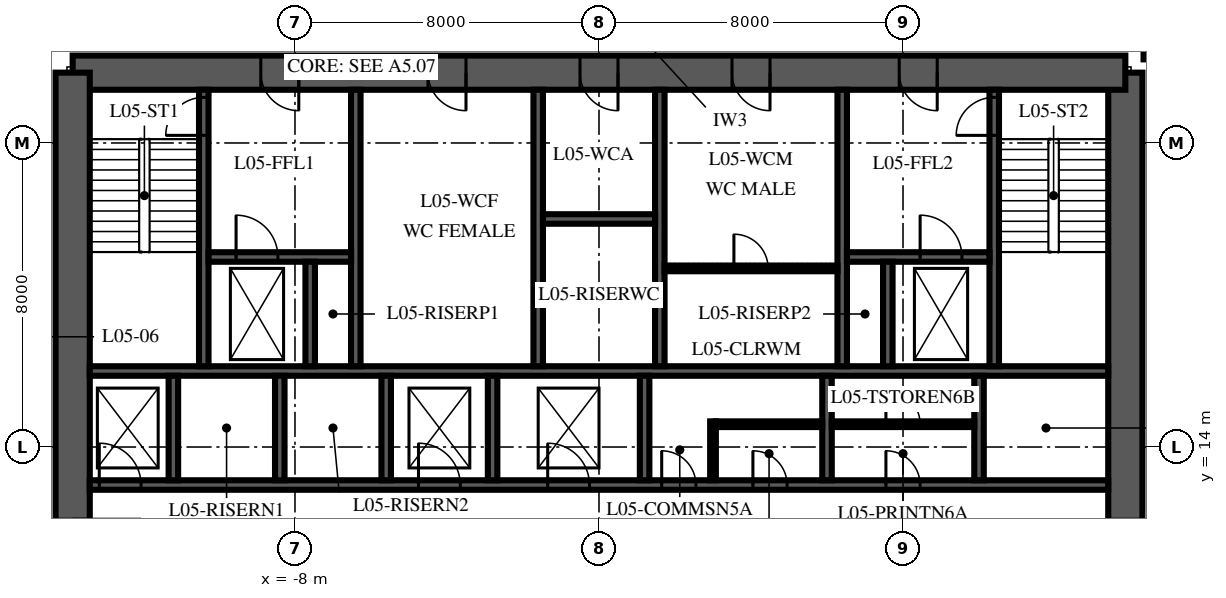
"""IFC4 building model, lengths in metres.
Left out: names, types, materials, properties, quantities, classifications, styles, units other than length and angle.
Written with IfcOpenShell. Run it as: python <this file> out.ifc"""

import sys

from ifc_helpers import new_model, si_unit, direction, frame, frame_2d, origin, place, context, subcontext, project, spatial, polyline, rectangle, outline, extrude, element, fill, save


model = new_model("IFC4")
c1 = context("Model", 3, precision=1e-05, world=origin(), true_north=direction((0.0, 1.0)))
c2 = subcontext(c1, "Body", "Model", "MODEL_VIEW")
j1 = project(units=[si_unit("LENGTHUNIT", "METRE"), si_unit("PLANEANGLEUNIT", "RADIAN")], contexts=[c1])
p1 = place(None, origin())
s1 = spatial("IfcSite", under=j1, at=p1, CompositionType="ELEMENT")
p2 = place(p1, origin())
s2 = spatial("IfcBuilding", under=s1, at=p2, CompositionType="ELEMENT")
p3 = place(p2, frame((0.0, 0.0, 32.0)))
s3 = spatial("IfcBuildingStorey", under=s2, at=p3, CompositionType="ELEMENT", Elevation=32.0)
p4 = place(p3, frame((13.85, 6.15, 0.0), z_axis=(0.0, 0.0, 1.0), x_axis=(0.0, 1.0, 0.0)))
e1 = element("IfcWall", 1, at=p4, inside=s3, PredefinedType="SHEAR", context=c2, shape_type="SweptSolid", body=[
    extrude(outline(polyline([(0.0, -0.45), (17.7, -0.45), (17.7, 0.0), (17.25, 0.0), (17.25, 0.45), (0.45, 0.45), (0.45, 0.0), (0.0, 0.0), (0.0, -0.45)])), origin(), (0.0, 0.0, 1.0), 4.0),
])
p5 = place(p4, frame((4.15, 0.0, 0.0)))
e2 = element("IfcOpeningElement", 2, at=p5, cuts=e1, PredefinedType="OPENING", context=c2, shape_type="SweptSolid", body=[
    extrude(rectangle(XDim=1.8, YDim=2.4, at=frame_2d((0.9, 1.2))), frame((0.0, 0.465, 0.0), z_axis=(0.0, -1.0, 0.0), x_axis=(1.0, 0.0, 0.0)), (0.0, 0.0, 1.0), 0.93),
])
p6 = place(p3, frame((13.85, 23.85, 0.0), z_axis=(0.0, 0.0, 1.0), x_axis=(-1.0, 0.0, 0.0)))
e3 = element("IfcWall", 3, at=p6, inside=s3, PredefinedType="SHEAR", context=c2, shape_type="SweptSolid", body=[
    extrude(rectangle(XDim=27.7, YDim=0.9, at=frame_2d((13.85, 0.0))), origin(), (0.0, 0.0, 1.0), 4.0),
])
p7 = place(p6, frame((21.75, 0.0, 0.0)))
e4 = element("IfcOpeningElement", 4, at=p7, cuts=e3, PredefinedType="OPENING", context=c2, shape_type="SweptSolid", body=[
    extrude(rectangle(XDim=1.0, YDim=2.1, at=frame_2d((0.5, 1.05))), frame((0.0, 0.465, 0.0), z_axis=(0.0, -1.0, 0.0), x_axis=(1.0, 0.0, 0.0)), (0.0, 0.0, 1.0), 0.93),
])
p8 = place(p6, frame((4.95, 0.0, 0.0)))
e5 = element("IfcOpeningElement", 5, at=p8, cuts=e3, PredefinedType="OPENING", context=c2, shape_type="SweptSolid", body=[
    extrude(rectangle(XDim=1.0, YDim=2.1, at=frame_2d((0.5, 1.05))), frame((0.0, 0.465, 0.0), z_axis=(0.0, -1.0, 0.0), x_axis=(1.0, 0.0, 0.0)), (0.0, 0.0, 1.0), 0.93),
])
p9 = place(p6, frame((17.35, 0.0, 0.0)))
e6 = element("IfcOpeningElement", 6, at=p9, cuts=e3, PredefinedType="OPENING", context=c2, shape_type="SweptSolid", body=[
    extrude(rectangle(XDim=1.0, YDim=2.1, at=frame_2d((0.5, 1.05))), frame((0.0, 0.465, 0.0), z_axis=(0.0, -1.0, 0.0), x_axis=(1.0, 0.0, 0.0)), (0.0, 0.0, 1.0), 0.93),
])
p10 = place(p6, frame((13.35, 0.0, 0.0)))
e7 = element("IfcOpeningElement", 7, at=p10, cuts=e3, PredefinedType="OPENING", context=c2, shape_type="SweptSolid", body=[
    extrude(rectangle(XDim=1.0, YDim=2.1, at=frame_2d((0.5, 1.05))), frame((0.0, 0.465, 0.0), z_axis=(0.0, -1.0, 0.0), x_axis=(1.0, 0.0, 0.0)), (0.0, 0.0, 1.0), 0.93),
])
p11 = place(p6, frame((9.35, 0.0, 0.0)))
e8 = element("IfcOpeningElement", 8, at=p11, cuts=e3, PredefinedType="OPENING", context=c2, shape_type="SweptSolid", body=[
    extrude(rectangle(XDim=1.0, YDim=2.1, at=frame_2d((0.5, 1.05))), frame((0.0, 0.465, 0.0), z_axis=(0.0, -1.0, 0.0), x_axis=(1.0, 0.0, 0.0)), (0.0, 0.0, 1.0), 0.93),
])
p12 = place(p3, frame((-13.85, 23.85, 0.0), z_axis=(0.0, 0.0, 1.0), x_axis=(0.0, -1.0, 0.0)))
e9 = element("IfcWall", 9, at=p12, inside=s3, PredefinedType="SHEAR", context=c2, shape_type="SweptSolid", body=[
    extrude(outline(polyline([(0.0, -0.45), (17.7, -0.45), (17.7, 0.0), (17.25, 0.0), (17.25, 0.45), (0.45, 0.45), (0.45, 0.0), (0.0, 0.0), (0.0, -0.45)])), origin(), (0.0, 0.0, 1.0), 4.0),
])
p13 = place(p12, frame((11.75, 0.0, 0.0)))
e10 = element("IfcOpeningElement", 10, at=p13, cuts=e9, PredefinedType="OPENING", context=c2, shape_type="SweptSolid", body=[
    extrude(rectangle(XDim=1.8, YDim=2.4, at=frame_2d((0.9, 1.2))), frame((0.0, 0.465, 0.0), z_axis=(0.0, -1.0, 0.0), x_axis=(1.0, 0.0, 0.0)), (0.0, 0.0, 1.0), 0.93),
])
p14 = place(p3, frame((-13.4, 13.0, 0.0), z_axis=(0.0, 0.0, 1.0), x_axis=(1.0, 0.0, 0.0)))
e11 = element("IfcWall", 11, at=p14, inside=s3, PredefinedType="SHEAR", context=c2, shape_type="SweptSolid", body=[
    extrude(rectangle(XDim=26.8, YDim=0.25, at=frame_2d((13.4, 0.0))), origin(), (0.0, 0.0, 1.0), 4.0),
])
p15 = place(p14, frame((0.25, 0.0, 0.0)))
e12 = element("IfcOpeningElement", 12, at=p15, cuts=e11, PredefinedType="OPENING", context=c2, shape_type="SweptSolid", body=[
    extrude(rectangle(XDim=1.1, YDim=2.1, at=frame_2d((0.55, 1.05))), frame((0.0, 0.14, 0.0), z_axis=(0.0, -1.0, 0.0), x_axis=(1.0, 0.0, 0.0)), (0.0, 0.0, 1.0), 0.28),
])
p16 = place(p14, frame((8.65, 0.0, 0.0)))
e13 = element("IfcOpeningElement", 13, at=p16, cuts=e11, PredefinedType="OPENING", context=c2, shape_type="SweptSolid", body=[
    extrude(rectangle(XDim=1.1, YDim=2.1, at=frame_2d((0.55, 1.05))), frame((0.0, 0.14, 0.0), z_axis=(0.0, -1.0, 0.0), x_axis=(1.0, 0.0, 0.0)), (0.0, 0.0, 1.0), 0.28),
])
p17 = place(p14, frame((12.05, 0.0, 0.0)))
e14 = element("IfcOpeningElement", 14, at=p17, cuts=e11, PredefinedType="OPENING", context=c2, shape_type="SweptSolid", body=[
    extrude(rectangle(XDim=1.1, YDim=2.1, at=frame_2d((0.55, 1.05))), frame((0.0, 0.14, 0.0), z_axis=(0.0, -1.0, 0.0), x_axis=(1.0, 0.0, 0.0)), (0.0, 0.0, 1.0), 0.28),
])
p18 = place(p14, frame((15.05, 0.0, 0.0)))
e15 = element("IfcOpeningElement", 15, at=p18, cuts=e11, PredefinedType="OPENING", context=c2, shape_type="SweptSolid", body=[
    extrude(rectangle(XDim=0.9, YDim=2.1, at=frame_2d((0.45, 1.05))), frame((0.0, 0.14, 0.0), z_axis=(0.0, -1.0, 0.0), x_axis=(1.0, 0.0, 0.0)), (0.0, 0.0, 1.0), 0.28),
])
p19 = place(p14, frame((17.45, 0.0, 0.0)))
e16 = element("IfcOpeningElement", 16, at=p19, cuts=e11, PredefinedType="OPENING", context=c2, shape_type="SweptSolid", body=[
    extrude(rectangle(XDim=0.9, YDim=2.1, at=frame_2d((0.45, 1.05))), frame((0.0, 0.14, 0.0), z_axis=(0.0, -1.0, 0.0), x_axis=(1.0, 0.0, 0.0)), (0.0, 0.0, 1.0), 0.28),
])
p20 = place(p14, frame((20.95, 0.0, 0.0)))
e17 = element("IfcOpeningElement", 17, at=p20, cuts=e11, PredefinedType="OPENING", context=c2, shape_type="SweptSolid", body=[
    extrude(rectangle(XDim=0.9, YDim=2.1, at=frame_2d((0.45, 1.05))), frame((0.0, 0.14, 0.0), z_axis=(0.0, -1.0, 0.0), x_axis=(1.0, 0.0, 0.0)), (0.0, 0.0, 1.0), 0.28),
])
p21 = place(p3, frame((-13.4, 16.0, 0.0), z_axis=(0.0, 0.0, 1.0), x_axis=(1.0, 0.0, 0.0)))
e18 = element("IfcWall", 18, at=p21, inside=s3, PredefinedType="SHEAR", context=c2, shape_type="SweptSolid", body=[
    extrude(rectangle(XDim=26.8, YDim=0.25, at=frame_2d((13.4, 0.0))), origin(), (0.0, 0.0, 1.0), 4.0),
])
for number, where, z_axis, x_axis in (
    (19, (-11.2, 13.125, 0.0), (0.0, 0.0, 1.0), (0.0, 1.0, 0.0)),
    (20, (-8.4, 13.125, 0.0), (0.0, 0.0, 1.0), (0.0, 1.0, 0.0)),
    (21, (-5.6, 13.125, 0.0), (0.0, 0.0, 1.0), (0.0, 1.0, 0.0)),
    (22, (-2.8, 13.125, 0.0), (0.0, 0.0, 1.0), (0.0, 1.0, 0.0)),
    (23, (1.2, 13.125, 0.0), (0.0, 0.0, 1.0), (0.0, 1.0, 0.0)),
    (24, (6.0, 13.125, 0.0), (0.0, 0.0, 1.0), (0.0, 1.0, 0.0)),
    (25, (10.0, 13.125, 0.0), (0.0, 0.0, 1.0), (0.0, 1.0, 0.0)),
):
    element("IfcWall", number, at=place(p3, frame(where, z_axis=z_axis, x_axis=x_axis)), inside=s3, PredefinedType="SHEAR", context=c2, shape_type="SweptSolid", body=[
        extrude(rectangle(XDim=2.75, YDim=0.25, at=frame_2d((1.375, 0.0))), origin(), (0.0, 0.0, 1.0), 4.0),
    ])
p22 = place(p3, frame((-10.4, 16.125, 0.0), z_axis=(0.0, 0.0, 1.0), x_axis=(0.0, 1.0, 0.0)))
e26 = element("IfcWall", 26, at=p22, inside=s3, PredefinedType="SHEAR", context=c2, shape_type="SweptSolid", body=[
    extrude(rectangle(XDim=7.275, YDim=0.25, at=frame_2d((3.637, 0.0))), origin(), (0.0, 0.0, 1.0), 4.0),
])
p23 = place(p22, frame((6.075, 0.0, 0.0)))
e27 = element("IfcOpeningElement", 27, at=p23, cuts=e26, PredefinedType="OPENING", context=c2, shape_type="SweptSolid", body=[
    extrude(rectangle(XDim=1.0, YDim=2.1, at=frame_2d((0.5, 1.05))), frame((0.0, 0.14, 0.0), z_axis=(0.0, -1.0, 0.0), x_axis=(1.0, 0.0, 0.0)), (0.0, 0.0, 1.0), 0.28),
])
for number, where, z_axis, x_axis in (
    (28, (-6.4, 16.125, 0.0), (0.0, 0.0, 1.0), (0.0, 1.0, 0.0)),
    (29, (-1.6, 16.125, 0.0), (0.0, 0.0, 1.0), (0.0, 1.0, 0.0)),
    (30, (1.6, 16.125, 0.0), (0.0, 0.0, 1.0), (0.0, 1.0, 0.0)),
    (31, (6.4, 16.125, 0.0), (0.0, 0.0, 1.0), (0.0, 1.0, 0.0)),
):
    element("IfcWall", number, at=place(p3, frame(where, z_axis=z_axis, x_axis=x_axis)), inside=s3, PredefinedType="SHEAR", context=c2, shape_type="SweptSolid", body=[
        extrude(rectangle(XDim=7.275, YDim=0.25, at=frame_2d((3.637, 0.0))), origin(), (0.0, 0.0, 1.0), 4.0),
    ])
p24 = place(p3, frame((10.4, 16.125, 0.0), z_axis=(0.0, 0.0, 1.0), x_axis=(0.0, 1.0, 0.0)))
e32 = element("IfcWall", 32, at=p24, inside=s3, PredefinedType="SHEAR", context=c2, shape_type="SweptSolid", body=[
    extrude(rectangle(XDim=7.275, YDim=0.25, at=frame_2d((3.637, 0.0))), origin(), (0.0, 0.0, 1.0), 4.0),
])
p25 = place(p24, frame((6.075, 0.0, 0.0)))
e33 = element("IfcOpeningElement", 33, at=p25, cuts=e32, PredefinedType="OPENING", context=c2, shape_type="SweptSolid", body=[
    extrude(rectangle(XDim=1.0, YDim=2.1, at=frame_2d((0.5, 1.05))), frame((0.0, 0.14, 0.0), z_axis=(0.0, -1.0, 0.0), x_axis=(1.0, 0.0, 0.0)), (0.0, 0.0, 1.0), 0.28),
])
p26 = place(p3, frame((-10.275, 19.0, 0.0), z_axis=(0.0, 0.0, 1.0), x_axis=(1.0, 0.0, 0.0)))
e34 = element("IfcWall", 34, at=p26, inside=s3, PredefinedType="SHEAR", context=c2, shape_type="SweptSolid", body=[
    extrude(rectangle(XDim=3.75, YDim=0.25, at=frame_2d((1.875, 0.0))), origin(), (0.0, 0.0, 1.0), 4.0),
])
p27 = place(p26, frame((0.725, 0.0, 0.0)))
e35 = element("IfcOpeningElement", 35, at=p27, cuts=e34, PredefinedType="OPENING", context=c2, shape_type="SweptSolid", body=[
    extrude(rectangle(XDim=1.1, YDim=2.1, at=frame_2d((0.55, 1.05))), frame((0.0, 0.14, 0.0), z_axis=(0.0, -1.0, 0.0), x_axis=(1.0, 0.0, 0.0)), (0.0, 0.0, 1.0), 0.28),
])
p28 = place(p3, frame((6.525, 19.0, 0.0), z_axis=(0.0, 0.0, 1.0), x_axis=(1.0, 0.0, 0.0)))
e36 = element("IfcWall", 36, at=p28, inside=s3, PredefinedType="SHEAR", context=c2, shape_type="SweptSolid", body=[
    extrude(rectangle(XDim=3.75, YDim=0.25, at=frame_2d((1.875, 0.0))), origin(), (0.0, 0.0, 1.0), 4.0),
])
p29 = place(p28, frame((1.925, 0.0, 0.0)))
e37 = element("IfcOpeningElement", 37, at=p29, cuts=e36, PredefinedType="OPENING", context=c2, shape_type="SweptSolid", body=[
    extrude(rectangle(XDim=1.1, YDim=2.1, at=frame_2d((0.55, 1.05))), frame((0.0, 0.14, 0.0), z_axis=(0.0, -1.0, 0.0), x_axis=(1.0, 0.0, 0.0)), (0.0, 0.0, 1.0), 0.28),
])
for number, where, z_axis, x_axis in (
    (38, (-7.6, 16.125, 0.0), (0.0, 0.0, 1.0), (0.0, 1.0, 0.0)),
    (39, (7.6, 16.125, 0.0), (0.0, 0.0, 1.0), (0.0, 1.0, 0.0)),
):
    element("IfcWall", number, at=place(p3, frame(where, z_axis=z_axis, x_axis=x_axis)), inside=s3, PredefinedType="SHEAR", context=c2, shape_type="SweptSolid", body=[
        extrude(rectangle(XDim=2.75, YDim=0.25, at=frame_2d((1.375, 0.0))), origin(), (0.0, 0.0, 1.0), 4.0),
    ])
p30 = place(p3, frame((-1.475, 20.0, 0.0), z_axis=(0.0, 0.0, 1.0), x_axis=(1.0, 0.0, 0.0)))
e40 = element("IfcWall", 40, at=p30, inside=s3, PredefinedType="SHEAR", context=c2, shape_type="SweptSolid", body=[
    extrude(rectangle(XDim=2.95, YDim=0.25, at=frame_2d((1.475, 0.0))), origin(), (0.0, 0.0, 1.0), 4.0),
])
p31 = place(p3, frame((1.725, 18.7, 0.0), z_axis=(0.0, 0.0, 1.0), x_axis=(1.0, 0.0, 0.0)))
e41 = element("IfcWall", 41, at=p31, inside=s3, PredefinedType="PARTITIONING", context=c2, shape_type="SweptSolid", body=[
    extrude(rectangle(XDim=4.55, YDim=0.15, at=frame_2d((2.275, 0.0))), origin(), (0.0, 0.0, 1.0), 3.85),
])
p32 = place(p31, frame((1.825, 0.0, 0.0)))
e42 = element("IfcOpeningElement", 42, at=p32, cuts=e41, PredefinedType="OPENING", context=c2, shape_type="SweptSolid", body=[
    extrude(rectangle(XDim=0.9, YDim=2.1, at=frame_2d((0.45, 1.05))), frame((0.0, 0.09, 0.0), z_axis=(0.0, -1.0, 0.0), x_axis=(1.0, 0.0, 0.0)), (0.0, 0.0, 1.0), 0.18),
])
p33 = place(p3, frame((3.0, 13.125, 0.0), z_axis=(0.0, 0.0, 1.0), x_axis=(0.0, 1.0, 0.0)))
e43 = element("IfcWall", 43, at=p33, inside=s3, PredefinedType="PARTITIONING", context=c2, shape_type="SweptSolid", body=[
    extrude(rectangle(XDim=1.55, YDim=0.15, at=frame_2d((0.775, 0.0))), origin(), (0.0, 0.0, 1.0), 3.85),
])
p34 = place(p3, frame((3.075, 14.6, 0.0), z_axis=(0.0, 0.0, 1.0), x_axis=(1.0, 0.0, 0.0)))
e44 = element("IfcWall", 44, at=p34, inside=s3, PredefinedType="PARTITIONING", context=c2, shape_type="SweptSolid", body=[
    extrude(rectangle(XDim=2.8, YDim=0.15, at=frame_2d((1.4, 0.0))), origin(), (0.0, 0.0, 1.0), 3.85),
])
p35 = place(p3, frame((6.125, 14.6, 0.0), z_axis=(0.0, 0.0, 1.0), x_axis=(1.0, 0.0, 0.0)))
e45 = element("IfcWall", 45, at=p35, inside=s3, PredefinedType="PARTITIONING", context=c2, shape_type="SweptSolid", body=[
    extrude(rectangle(XDim=3.75, YDim=0.15, at=frame_2d((1.875, 0.0))), origin(), (0.0, 0.0, 1.0), 3.85),
])
p36 = place(p35, frame((1.425, 0.0, 0.0)))
e46 = element("IfcOpeningElement", 46, at=p36, cuts=e45, PredefinedType="OPENING", context=c2, shape_type="SweptSolid", body=[
    extrude(rectangle(XDim=0.9, YDim=2.1, at=frame_2d((0.45, 1.05))), frame((0.0, 0.09, 0.0), z_axis=(0.0, -1.0, 0.0), x_axis=(1.0, 0.0, 0.0)), (0.0, 0.0, 1.0), 0.18),
])
p37 = place(p3, frame((14.33, 24.3, 0.0), z_axis=(0.0, 0.0, 1.0), x_axis=(1.0, 0.0, 0.0)))
e47 = element("IfcWall", 47, at=p37, inside=s3, PredefinedType="PARTITIONING", context=c2, shape_type="SweptSolid", body=[
    extrude(rectangle(XDim=1.77, YDim=0.2, at=frame_2d((0.885, 0.0))), origin(), (0.0, 0.0, 1.0), 3.4),
])
p38 = place(p7, origin())
e48 = element("IfcDoor", 48, at=p38, inside=s3, OperationType="SINGLE_SWING_RIGHT", PredefinedType="DOOR", context=c2, shape_type="SweptSolid", body=[
    extrude(rectangle(XDim=1.0, YDim=2.1, at=frame_2d((0.5, 1.05))), frame((0.0, 0.45, 0.0), z_axis=(0.0, -1.0, 0.0), x_axis=(1.0, 0.0, 0.0)), (0.0, 0.0, 1.0), 0.899),
])
fill(e4, e48)
p39 = place(p8, origin())
e49 = element("IfcDoor", 49, at=p39, inside=s3, OperationType="SINGLE_SWING_RIGHT", PredefinedType="DOOR", context=c2, shape_type="SweptSolid", body=[
    extrude(rectangle(XDim=1.0, YDim=2.1, at=frame_2d((0.5, 1.05))), frame((0.0, 0.45, 0.0), z_axis=(0.0, -1.0, 0.0), x_axis=(1.0, 0.0, 0.0)), (0.0, 0.0, 1.0), 0.899),
])
fill(e5, e49)
p40 = place(p9, origin())
e50 = element("IfcDoor", 50, at=p40, inside=s3, OperationType="SINGLE_SWING_LEFT", PredefinedType="DOOR", context=c2, shape_type="SweptSolid", body=[
    extrude(rectangle(XDim=1.0, YDim=2.1, at=frame_2d((0.5, 1.05))), frame((0.0, 0.45, 0.0), z_axis=(0.0, -1.0, 0.0), x_axis=(1.0, 0.0, 0.0)), (0.0, 0.0, 1.0), 0.899),
])
fill(e6, e50)
p41 = place(p10, origin())
e51 = element("IfcDoor", 51, at=p41, inside=s3, OperationType="SINGLE_SWING_LEFT", PredefinedType="DOOR", context=c2, shape_type="SweptSolid", body=[
    extrude(rectangle(XDim=1.0, YDim=2.1, at=frame_2d((0.5, 1.05))), frame((0.0, 0.45, 0.0), z_axis=(0.0, -1.0, 0.0), x_axis=(1.0, 0.0, 0.0)), (0.0, 0.0, 1.0), 0.899),
])
fill(e7, e51)
p42 = place(p11, origin())
e52 = element("IfcDoor", 52, at=p42, inside=s3, OperationType="SINGLE_SWING_LEFT", PredefinedType="DOOR", context=c2, shape_type="SweptSolid", body=[
    extrude(rectangle(XDim=1.0, YDim=2.1, at=frame_2d((0.5, 1.05))), frame((0.0, 0.45, 0.0), z_axis=(0.0, -1.0, 0.0), x_axis=(1.0, 0.0, 0.0)), (0.0, 0.0, 1.0), 0.899),
])
fill(e8, e52)
p43 = place(p23, origin())
e53 = element("IfcDoor", 53, at=p43, inside=s3, OperationType="SINGLE_SWING_LEFT", PredefinedType="DOOR", context=c2, shape_type="SweptSolid", body=[
    extrude(rectangle(XDim=1.0, YDim=2.1, at=frame_2d((0.5, 1.05))), frame((0.0, 0.125, 0.0), z_axis=(0.0, -1.0, 0.0), x_axis=(1.0, 0.0, 0.0)), (0.0, 0.0, 1.0), 0.25),
])
fill(e27, e53)
p44 = place(p25, origin())
e54 = element("IfcDoor", 54, at=p44, inside=s3, OperationType="SINGLE_SWING_LEFT", PredefinedType="DOOR", context=c2, shape_type="SweptSolid", body=[
    extrude(rectangle(XDim=1.0, YDim=2.1, at=frame_2d((0.5, 1.05))), frame((0.0, 0.125, 0.0), z_axis=(0.0, -1.0, 0.0), x_axis=(1.0, 0.0, 0.0)), (0.0, 0.0, 1.0), 0.25),
])
fill(e33, e54)
p45 = place(p15, origin())
e55 = element("IfcDoor", 55, at=p45, inside=s3, OperationType="SLIDING_TO_LEFT", PredefinedType="DOOR", context=c2, shape_type="SweptSolid", body=[
    extrude(rectangle(XDim=1.1, YDim=2.1, at=frame_2d((0.55, 1.05))), frame((0.0, 0.125, 0.0), z_axis=(0.0, -1.0, 0.0), x_axis=(1.0, 0.0, 0.0)), (0.0, 0.0, 1.0), 0.25),
])
fill(e12, e55)
p46 = place(p16, origin())
e56 = element("IfcDoor", 56, at=p46, inside=s3, OperationType="SLIDING_TO_LEFT", PredefinedType="DOOR", context=c2, shape_type="SweptSolid", body=[
    extrude(rectangle(XDim=1.1, YDim=2.1, at=frame_2d((0.55, 1.05))), frame((0.0, 0.125, 0.0), z_axis=(0.0, -1.0, 0.0), x_axis=(1.0, 0.0, 0.0)), (0.0, 0.0, 1.0), 0.25),
])
fill(e13, e56)
p47 = place(p17, origin())
e57 = element("IfcDoor", 57, at=p47, inside=s3, OperationType="SLIDING_TO_LEFT", PredefinedType="DOOR", context=c2, shape_type="SweptSolid", body=[
    extrude(rectangle(XDim=1.1, YDim=2.1, at=frame_2d((0.55, 1.05))), frame((0.0, 0.125, 0.0), z_axis=(0.0, -1.0, 0.0), x_axis=(1.0, 0.0, 0.0)), (0.0, 0.0, 1.0), 0.25),
])
fill(e14, e57)
p48 = place(p29, origin())
e58 = element("IfcDoor", 58, at=p48, inside=s3, OperationType="SLIDING_TO_RIGHT", PredefinedType="DOOR", context=c2, shape_type="SweptSolid", body=[
    extrude(rectangle(XDim=1.1, YDim=2.1, at=frame_2d((0.55, 1.05))), frame((0.0, 0.125, 0.0), z_axis=(0.0, -1.0, 0.0), x_axis=(1.0, 0.0, 0.0)), (0.0, 0.0, 1.0), 0.25),
])
fill(e37, e58)
p49 = place(p27, origin())
e59 = element("IfcDoor", 59, at=p49, inside=s3, OperationType="SLIDING_TO_RIGHT", PredefinedType="DOOR", context=c2, shape_type="SweptSolid", body=[
    extrude(rectangle(XDim=1.1, YDim=2.1, at=frame_2d((0.55, 1.05))), frame((0.0, 0.125, 0.0), z_axis=(0.0, -1.0, 0.0), x_axis=(1.0, 0.0, 0.0)), (0.0, 0.0, 1.0), 0.25),
])
fill(e35, e59)
p50 = place(p18, origin())
e60 = element("IfcDoor", 60, at=p50, inside=s3, OperationType="SINGLE_SWING_LEFT", PredefinedType="DOOR", context=c2, shape_type="SweptSolid", body=[
    extrude(rectangle(XDim=0.9, YDim=2.1, at=frame_2d((0.45, 1.05))), frame((0.0, 0.125, 0.0), z_axis=(0.0, -1.0, 0.0), x_axis=(1.0, 0.0, 0.0)), (0.0, 0.0, 1.0), 0.25),
])
fill(e15, e60)
p51 = place(p19, origin())
e61 = element("IfcDoor", 61, at=p51, inside=s3, OperationType="SINGLE_SWING_LEFT", PredefinedType="DOOR", context=c2, shape_type="SweptSolid", body=[
    extrude(rectangle(XDim=0.9, YDim=2.1, at=frame_2d((0.45, 1.05))), frame((0.0, 0.125, 0.0), z_axis=(0.0, -1.0, 0.0), x_axis=(1.0, 0.0, 0.0)), (0.0, 0.0, 1.0), 0.25),
])
fill(e16, e61)
p52 = place(p20, origin())
e62 = element("IfcDoor", 62, at=p52, inside=s3, OperationType="SINGLE_SWING_LEFT", PredefinedType="DOOR", context=c2, shape_type="SweptSolid", body=[
    extrude(rectangle(XDim=0.9, YDim=2.1, at=frame_2d((0.45, 1.05))), frame((0.0, 0.125, 0.0), z_axis=(0.0, -1.0, 0.0), x_axis=(1.0, 0.0, 0.0)), (0.0, 0.0, 1.0), 0.25),
])
fill(e17, e62)
p53 = place(p36, origin())
e63 = element("IfcDoor", 63, at=p53, inside=s3, OperationType="SINGLE_SWING_LEFT", PredefinedType="DOOR", context=c2, shape_type="SweptSolid", body=[
    extrude(rectangle(XDim=0.9, YDim=2.1, at=frame_2d((0.45, 1.05))), frame((0.0, 0.075, 0.0), z_axis=(0.0, -1.0, 0.0), x_axis=(1.0, 0.0, 0.0)), (0.0, 0.0, 1.0), 0.149),
])
fill(e46, e63)
p54 = place(p32, origin())
e64 = element("IfcDoor", 64, at=p54, inside=s3, OperationType="SINGLE_SWING_LEFT", PredefinedType="DOOR", context=c2, shape_type="SweptSolid", body=[
    extrude(rectangle(XDim=0.9, YDim=2.1, at=frame_2d((0.45, 1.05))), frame((0.0, 0.075, 0.0), z_axis=(0.0, -1.0, 0.0), x_axis=(1.0, 0.0, 0.0)), (0.0, 0.0, 1.0), 0.149),
])
fill(e42, e64)
save(model, sys.argv[1])
